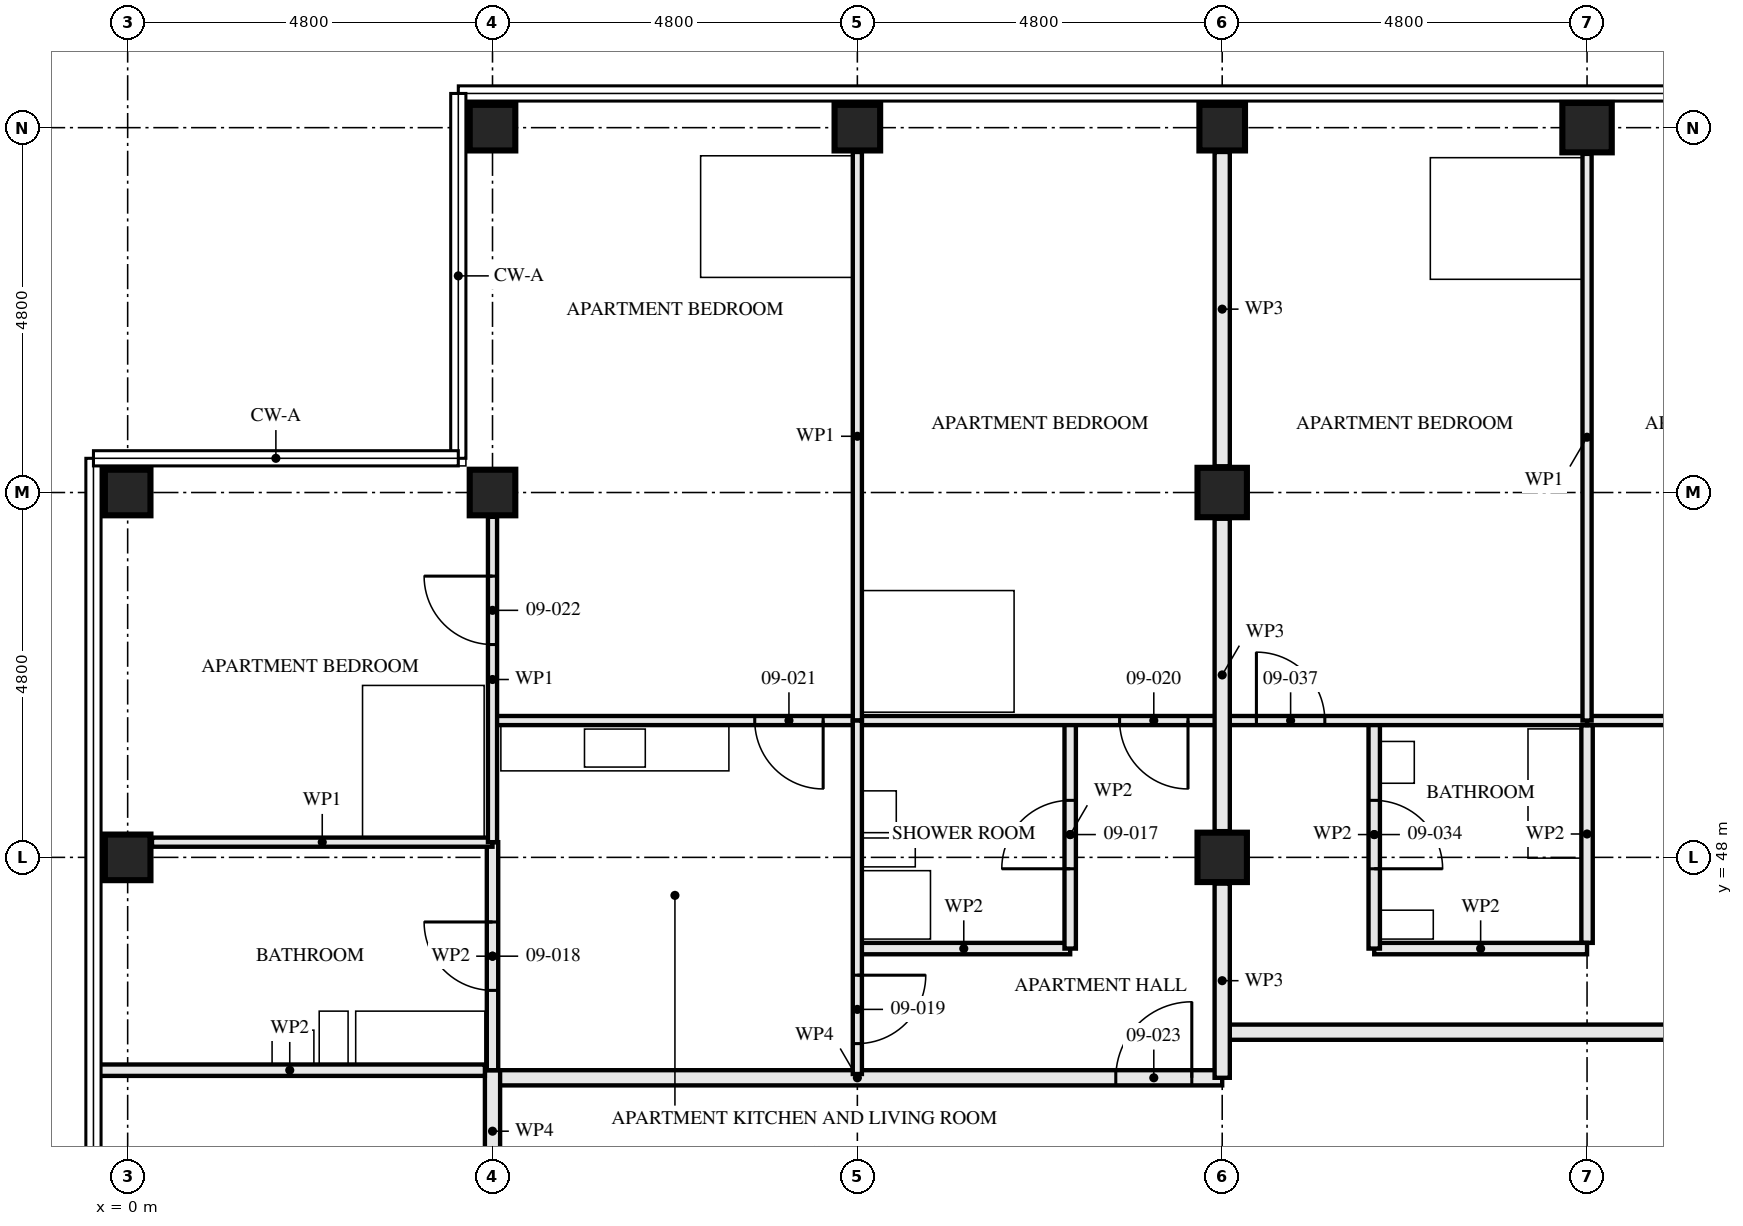
"""IFC4 building model, lengths in metres.
Left out: names, types, materials, properties, quantities, classifications, styles, units other than length and angle.
Written with IfcOpenShell. Run it as: python <this file> out.ifc"""

import sys

from ifc_helpers import new_model, si_unit, direction, frame, frame_2d, origin, origin_2d, place, context, subcontext, project, spatial, rectangle, hollow_rectangle, extrude, element, fill, save


model = new_model("IFC4")
c1 = context("Model", 3, precision=1e-05, world=origin(), true_north=direction((0.0, 1.0)))
c2 = subcontext(c1, "Body", "Model", "MODEL_VIEW")
j1 = project(units=[si_unit("LENGTHUNIT", "METRE"), si_unit("PLANEANGLEUNIT", "RADIAN")], contexts=[c1])
p1 = place(None, origin())
s1 = spatial("IfcSite", under=j1, at=p1, CompositionType="ELEMENT")
p2 = place(p1, origin())
s2 = spatial("IfcBuilding", under=s1, at=p2, CompositionType="ELEMENT")
p3 = place(p2, frame((0.0, 0.0, 37.5)))
s3 = spatial("IfcBuildingStorey", under=s2, at=p3, CompositionType="ELEMENT", Elevation=37.5)
for number, where, z_axis, x_axis in (
    (1, (0.0, 48.0, 0.0), (0.0, 0.0, 1.0), (1.0, 0.0, 0.0)),
    (2, (0.0, 52.8, 0.0), (0.0, 0.0, 1.0), (0.0, 1.0, 0.0)),
    (3, (4.8, 52.8, 0.0), (0.0, 0.0, 1.0), (0.0, 1.0, 0.0)),
    (4, (4.8, 57.6, 0.0), (0.0, 0.0, 1.0), (0.0, 1.0, 0.0)),
    (5, (9.6, 57.6, 0.0), (0.0, 0.0, 1.0), (0.0, 1.0, 0.0)),
):
    element("IfcColumn", number, at=place(p3, frame(where, z_axis=z_axis, x_axis=x_axis)), inside=s3, PredefinedType="COLUMN", context=c2, shape_type="SweptSolid", body=[
        extrude(hollow_rectangle(XDim=0.6, YDim=0.6, WallThickness=0.08, at=origin_2d()), origin(), (0.0, 0.0, 1.0), 3.5),
    ])
for number, where, z_axis, x_axis in (
    (6, (14.4, 48.0, 0.0), (0.0, 0.0, 1.0), (1.0, 0.0, 0.0)),
    (7, (14.4, 52.8, 0.0), (0.0, 0.0, 1.0), (1.0, 0.0, 0.0)),
):
    element("IfcColumn", number, at=place(p3, frame(where, z_axis=z_axis, x_axis=x_axis)), inside=s3, PredefinedType="COLUMN", context=c2, shape_type="SweptSolid", body=[
        extrude(hollow_rectangle(XDim=0.65, YDim=0.65, WallThickness=0.05, at=origin_2d()), origin(), (0.0, 0.0, 1.0), 3.5),
    ])
p4 = place(p3, frame((14.4, 57.6, 0.0), z_axis=(0.0, 0.0, 1.0), x_axis=(0.0, 1.0, 0.0)))
e8 = element("IfcColumn", 8, at=p4, inside=s3, PredefinedType="COLUMN", context=c2, shape_type="SweptSolid", body=[
    extrude(hollow_rectangle(XDim=0.6, YDim=0.6, WallThickness=0.08, at=origin_2d()), origin(), (0.0, 0.0, 1.0), 3.5),
])
p5 = place(p3, frame((19.2, 57.6, 0.0), z_axis=(0.0, 0.0, 1.0), x_axis=(0.0, 1.0, 0.0)))
e9 = element("IfcColumn", 9, at=p5, inside=s3, PredefinedType="COLUMN", context=c2, shape_type="SweptSolid", body=[
    extrude(hollow_rectangle(XDim=0.65, YDim=0.65, WallThickness=0.08, at=origin_2d()), origin(), (0.0, 0.0, 1.0), 3.5),
])
p6 = place(p3, frame((12.4, 49.8, 0.0), z_axis=(0.0, 0.0, 1.0), x_axis=(0.0, -1.0, 0.0)))
e10 = element("IfcWall", 10, at=p6, inside=s3, PredefinedType="PARTITIONING", context=c2, shape_type="SweptSolid", body=[
    extrude(rectangle(XDim=3.0, YDim=0.15, at=frame_2d((1.5, 0.0))), origin(), (0.0, 0.0, 1.0), 2.55),
])
p7 = place(p6, frame((1.05, 0.0, 0.0)))
e11 = element("IfcOpeningElement", 11, at=p7, cuts=e10, PredefinedType="OPENING", context=c2, shape_type="SweptSolid", body=[
    extrude(rectangle(XDim=0.9, YDim=2.1, at=frame_2d((0.45, 1.05))), frame((0.0, 0.085, 0.0), z_axis=(0.0, -1.0, 0.0), x_axis=(1.0, 0.0, 0.0)), (0.0, 0.0, 1.0), 0.171),
])
p8 = place(p3, frame((12.4, 46.8, 0.0), z_axis=(0.0, 0.0, 1.0), x_axis=(-1.0, 0.0, 0.0)))
e12 = element("IfcWall", 12, at=p8, inside=s3, PredefinedType="PARTITIONING", context=c2, shape_type="SweptSolid", body=[
    extrude(rectangle(XDim=2.8, YDim=0.15, at=frame_2d((1.4, 0.0))), origin(), (0.0, 0.0, 1.0), 3.33),
])
p9 = place(p3, frame((4.8, 48.2, 0.0), z_axis=(0.0, 0.0, 1.0), x_axis=(0.0, -1.0, 0.0)))
e13 = element("IfcWall", 13, at=p9, inside=s3, PredefinedType="PARTITIONING", context=c2, shape_type="SweptSolid", body=[
    extrude(rectangle(XDim=3.0, YDim=0.15, at=frame_2d((1.5, 0.0))), origin(), (0.0, 0.0, 1.0), 2.55),
])
p10 = place(p9, frame((1.05, 0.0, 0.0)))
e14 = element("IfcOpeningElement", 14, at=p10, cuts=e13, PredefinedType="OPENING", context=c2, shape_type="SweptSolid", body=[
    extrude(rectangle(XDim=0.9, YDim=2.1, at=frame_2d((0.45, 1.05))), frame((0.0, 0.085, 0.0), z_axis=(0.0, -1.0, 0.0), x_axis=(1.0, 0.0, 0.0)), (0.0, 0.0, 1.0), 0.171),
])
p11 = place(p3, frame((9.6, 49.8, 0.0), z_axis=(0.0, 0.0, 1.0), x_axis=(0.0, -1.0, 0.0)))
e15 = element("IfcWall", 15, at=p11, inside=s3, PredefinedType="PARTITIONING", context=c2, shape_type="SweptSolid", body=[
    extrude(rectangle(XDim=4.65, YDim=0.12, at=frame_2d((2.325, 0.0))), origin(), (0.0, 0.0, 1.0), 2.55),
])
p12 = place(p11, frame((3.35, 0.0, 0.0)))
e16 = element("IfcOpeningElement", 16, at=p12, cuts=e15, PredefinedType="OPENING", context=c2, shape_type="SweptSolid", body=[
    extrude(rectangle(XDim=0.9, YDim=2.1, at=frame_2d((0.45, 1.05))), frame((0.0, 0.071, 0.0), z_axis=(0.0, -1.0, 0.0), x_axis=(1.0, 0.0, 0.0)), (0.0, 0.0, 1.0), 0.141),
])
p13 = place(p3, frame((14.4, 49.8, 0.0), z_axis=(0.0, 0.0, 1.0), x_axis=(-1.0, 0.0, 0.0)))
e17 = element("IfcWall", 17, at=p13, inside=s3, PredefinedType="PARTITIONING", context=c2, shape_type="SweptSolid", body=[
    extrude(rectangle(XDim=4.8, YDim=0.12, at=frame_2d((2.4, 0.0))), origin(), (0.0, 0.0, 1.0), 3.33),
])
p14 = place(p13, frame((0.45, 0.0, 0.0)))
e18 = element("IfcOpeningElement", 18, at=p14, cuts=e17, PredefinedType="OPENING", context=c2, shape_type="SweptSolid", body=[
    extrude(rectangle(XDim=0.9, YDim=2.1, at=frame_2d((0.45, 1.05))), frame((0.0, 0.071, 0.0), z_axis=(0.0, -1.0, 0.0), x_axis=(1.0, 0.0, 0.0)), (0.0, 0.0, 1.0), 0.141),
])
p15 = place(p3, frame((9.6, 49.8, 0.0), z_axis=(0.0, 0.0, 1.0), x_axis=(-1.0, 0.0, 0.0)))
e19 = element("IfcWall", 19, at=p15, inside=s3, PredefinedType="PARTITIONING", context=c2, shape_type="SweptSolid", body=[
    extrude(rectangle(XDim=4.8, YDim=0.12, at=frame_2d((2.4, 0.0))), origin(), (0.0, 0.0, 1.0), 3.33),
])
p16 = place(p15, frame((0.45, 0.0, 0.0)))
e20 = element("IfcOpeningElement", 20, at=p16, cuts=e19, PredefinedType="OPENING", context=c2, shape_type="SweptSolid", body=[
    extrude(rectangle(XDim=0.9, YDim=2.1, at=frame_2d((0.45, 1.05))), frame((0.0, 0.071, 0.0), z_axis=(0.0, -1.0, 0.0), x_axis=(1.0, 0.0, 0.0)), (0.0, 0.0, 1.0), 0.141),
])
p17 = place(p3, frame((4.8, 48.2, 0.0), z_axis=(0.0, 0.0, 1.0), x_axis=(-1.0, 0.0, 0.0)))
e21 = element("IfcWall", 21, at=p17, inside=s3, PredefinedType="PARTITIONING", context=c2, shape_type="SweptSolid", body=[
    extrude(rectangle(XDim=4.48, YDim=0.12, at=frame_2d((2.24, 0.0))), origin(), (0.0, 0.0, 1.0), 3.33),
])
p18 = place(p3, frame((9.6, 57.28, 0.0), z_axis=(0.0, 0.0, 1.0), x_axis=(0.0, -1.0, 0.0)))
e22 = element("IfcWall", 22, at=p18, inside=s3, PredefinedType="PARTITIONING", context=c2, shape_type="SweptSolid", body=[
    extrude(rectangle(XDim=7.48, YDim=0.12, at=frame_2d((3.74, 0.0))), origin(), (0.0, 0.0, 1.0), 2.55),
])
p19 = place(p3, frame((4.8, 52.48, 0.0), z_axis=(0.0, 0.0, 1.0), x_axis=(0.0, -1.0, 0.0)))
e23 = element("IfcWall", 23, at=p19, inside=s3, PredefinedType="PARTITIONING", context=c2, shape_type="SweptSolid", body=[
    extrude(rectangle(XDim=4.28, YDim=0.12, at=frame_2d((2.14, 0.0))), origin(), (0.0, 0.0, 1.0), 3.33),
])
p20 = place(p19, frame((0.78, 0.0, 0.0)))
e24 = element("IfcOpeningElement", 24, at=p20, cuts=e23, PredefinedType="OPENING", context=c2, shape_type="SweptSolid", body=[
    extrude(rectangle(XDim=0.9, YDim=2.1, at=frame_2d((0.45, 1.05))), frame((0.0, 0.071, 0.0), z_axis=(0.0, -1.0, 0.0), x_axis=(1.0, 0.0, 0.0)), (0.0, 0.0, 1.0), 0.141),
])
p21 = place(p3, frame((14.4, 45.1, 0.0), z_axis=(0.0, 0.0, 1.0), x_axis=(-1.0, 0.0, 0.0)))
e25 = element("IfcWall", 25, at=p21, inside=s3, PredefinedType="PARTITIONING", context=c2, shape_type="SweptSolid", body=[
    extrude(rectangle(XDim=9.6, YDim=0.2, at=frame_2d((4.8, 0.0))), origin(), (0.0, 0.0, 1.0), 3.33),
])
p22 = place(p21, frame((0.4, 0.0, 0.0)))
e26 = element("IfcOpeningElement", 26, at=p22, cuts=e25, PredefinedType="OPENING", context=c2, shape_type="SweptSolid", body=[
    extrude(rectangle(XDim=1.0, YDim=2.1, at=frame_2d((0.5, 1.05))), frame((0.0, 0.111, 0.0), z_axis=(0.0, -1.0, 0.0), x_axis=(1.0, 0.0, 0.0)), (0.0, 0.0, 1.0), 0.221),
])
p23 = place(p3, frame((4.8, 45.2, 0.0), z_axis=(0.0, 0.0, 1.0), x_axis=(0.0, -1.0, 0.0)))
e27 = element("IfcWall", 27, at=p23, inside=s3, PredefinedType="PARTITIONING", context=c2, shape_type="SweptSolid", body=[
    extrude(rectangle(XDim=1.605, YDim=0.2, at=frame_2d((0.802, 0.0))), origin(), (0.0, 0.0, 1.0), 3.33),
])
p24 = place(p3, frame((16.4, 49.8, 0.0), z_axis=(0.0, 0.0, 1.0), x_axis=(0.0, -1.0, 0.0)))
e28 = element("IfcWall", 28, at=p24, inside=s3, PredefinedType="PARTITIONING", context=c2, shape_type="SweptSolid", body=[
    extrude(rectangle(XDim=3.0, YDim=0.15, at=frame_2d((1.5, 0.0))), origin(), (0.0, 0.0, 1.0), 2.55),
])
p25 = place(p24, frame((1.05, 0.0, 0.0)))
e29 = element("IfcOpeningElement", 29, at=p25, cuts=e28, PredefinedType="OPENING", context=c2, shape_type="SweptSolid", body=[
    extrude(rectangle(XDim=0.9, YDim=2.1, at=frame_2d((0.45, 1.05))), frame((0.0, 0.085, 0.0), z_axis=(0.0, -1.0, 0.0), x_axis=(1.0, 0.0, 0.0)), (0.0, 0.0, 1.0), 0.171),
])
p26 = place(p3, frame((19.2, 46.8, 0.0), z_axis=(0.0, 0.0, 1.0), x_axis=(-1.0, 0.0, 0.0)))
e30 = element("IfcWall", 30, at=p26, inside=s3, PredefinedType="PARTITIONING", context=c2, shape_type="SweptSolid", body=[
    extrude(rectangle(XDim=2.8, YDim=0.15, at=frame_2d((1.4, 0.0))), origin(), (0.0, 0.0, 1.0), 3.33),
])
p27 = place(p3, frame((24.0, 49.8, 0.0), z_axis=(0.0, 0.0, 1.0), x_axis=(-1.0, 0.0, 0.0)))
e31 = element("IfcWall", 31, at=p27, inside=s3, PredefinedType="PARTITIONING", context=c2, shape_type="SweptSolid", body=[
    extrude(rectangle(XDim=4.8, YDim=0.12, at=frame_2d((2.4, 0.0))), origin(), (0.0, 0.0, 1.0), 3.33),
])
p28 = place(p27, frame((0.45, 0.0, 0.0)))
e32 = element("IfcOpeningElement", 32, at=p28, cuts=e31, PredefinedType="OPENING", context=c2, shape_type="SweptSolid", body=[
    extrude(rectangle(XDim=0.9, YDim=2.1, at=frame_2d((0.45, 1.05))), frame((0.0, 0.071, 0.0), z_axis=(0.0, -1.0, 0.0), x_axis=(1.0, 0.0, 0.0)), (0.0, 0.0, 1.0), 0.141),
])
p29 = place(p3, frame((19.2, 49.8, 0.0), z_axis=(0.0, 0.0, 1.0), x_axis=(-1.0, 0.0, 0.0)))
e33 = element("IfcWall", 33, at=p29, inside=s3, PredefinedType="PARTITIONING", context=c2, shape_type="SweptSolid", body=[
    extrude(rectangle(XDim=4.8, YDim=0.12, at=frame_2d((2.4, 0.0))), origin(), (0.0, 0.0, 1.0), 3.33),
])
p30 = place(p29, frame((3.45, 0.0, 0.0)))
e34 = element("IfcOpeningElement", 34, at=p30, cuts=e33, PredefinedType="OPENING", context=c2, shape_type="SweptSolid", body=[
    extrude(rectangle(XDim=0.9, YDim=2.1, at=frame_2d((0.45, 1.05))), frame((0.0, 0.071, 0.0), z_axis=(0.0, -1.0, 0.0), x_axis=(1.0, 0.0, 0.0)), (0.0, 0.0, 1.0), 0.141),
])
p31 = place(p3, frame((19.2, 57.255, 0.0), z_axis=(0.0, 0.0, 1.0), x_axis=(0.0, -1.0, 0.0)))
e35 = element("IfcWall", 35, at=p31, inside=s3, PredefinedType="PARTITIONING", context=c2, shape_type="SweptSolid", body=[
    extrude(rectangle(XDim=7.455, YDim=0.12, at=frame_2d((3.728, 0.0))), origin(), (0.0, 0.0, 1.0), 2.55),
])
p32 = place(p3, frame((28.8, 45.7, 0.0), z_axis=(0.0, 0.0, 1.0), x_axis=(-1.0, 0.0, 0.0)))
e36 = element("IfcWall", 36, at=p32, inside=s3, PredefinedType="PARTITIONING", context=c2, shape_type="SweptSolid", body=[
    extrude(rectangle(XDim=14.4, YDim=0.2, at=frame_2d((7.2, 0.0))), origin(), (0.0, 0.0, 1.0), 3.33),
])
p33 = place(p32, frame((0.4, 0.0, 0.0)))
e37 = element("IfcOpeningElement", 37, at=p33, cuts=e36, PredefinedType="OPENING", context=c2, shape_type="SweptSolid", body=[
    extrude(rectangle(XDim=1.0, YDim=2.1, at=frame_2d((0.5, 1.05))), frame((0.0, 0.111, 0.0), z_axis=(0.0, -1.0, 0.0), x_axis=(1.0, 0.0, 0.0)), (0.0, 0.0, 1.0), 0.221),
])
p34 = place(p3, frame((14.4, 45.1, 0.0), z_axis=(0.0, 0.0, 1.0), x_axis=(0.0, 1.0, 0.0)))
e38 = element("IfcWall", 38, at=p34, inside=s3, PredefinedType="PARTITIONING", context=c2, shape_type="SweptSolid", body=[
    extrude(rectangle(XDim=2.555, YDim=0.2, at=frame_2d((1.277, 0.0))), origin(), (0.0, 0.0, 1.0), 2.32),
])
p35 = place(p3, frame((14.4, 48.345, 0.0), z_axis=(0.0, 0.0, 1.0), x_axis=(0.0, 1.0, 0.0)))
e39 = element("IfcWall", 39, at=p35, inside=s3, PredefinedType="PARTITIONING", context=c2, shape_type="SweptSolid", body=[
    extrude(rectangle(XDim=4.11, YDim=0.2, at=frame_2d((2.055, 0.0))), origin(), (0.0, 0.0, 1.0), 2.32),
])
p36 = place(p3, frame((14.4, 53.145, 0.0), z_axis=(0.0, 0.0, 1.0), x_axis=(0.0, 1.0, 0.0)))
e40 = element("IfcWall", 40, at=p36, inside=s3, PredefinedType="PARTITIONING", context=c2, shape_type="SweptSolid", body=[
    extrude(rectangle(XDim=4.135, YDim=0.2, at=frame_2d((2.067, 0.0))), origin(), (0.0, 0.0, 1.0), 2.32),
])
p37 = place(p3, frame((4.7, 45.2, 0.0), z_axis=(0.0, 0.0, 1.0), x_axis=(-1.0, 0.0, 0.0)))
e41 = element("IfcWall", 41, at=p37, inside=s3, PredefinedType="PARTITIONING", context=c2, shape_type="SweptSolid", body=[
    extrude(rectangle(XDim=5.135, YDim=0.15, at=frame_2d((2.567, 0.0))), origin(), (0.0, 0.0, 1.0), 2.32),
])
p38 = place(p3, frame((19.2, 49.74, 0.0), z_axis=(0.0, 0.0, 1.0), x_axis=(0.0, -1.0, 0.0)))
e42 = element("IfcWall", 42, at=p38, inside=s3, PredefinedType="PARTITIONING", context=c2, shape_type="SweptSolid", body=[
    extrude(rectangle(XDim=2.865, YDim=0.15, at=frame_2d((1.433, 0.0))), origin(), (0.0, 0.0, 1.0), 2.55),
])
p39 = place(p7, frame((0.9, 0.0, 0.0), z_axis=(0.0, 0.0, 1.0), x_axis=(-1.0, 0.0, 0.0)))
e43 = element("IfcDoor", 43, at=p39, inside=s3, OperationType="SINGLE_SWING_RIGHT", PredefinedType="DOOR", context=c2, shape_type="SweptSolid", body=[
    extrude(rectangle(XDim=0.9, YDim=2.1, at=frame_2d((0.45, 1.05))), frame((0.0, 0.022, 0.0), z_axis=(0.0, -1.0, 0.0), x_axis=(1.0, 0.0, 0.0)), (0.0, 0.0, 1.0), 0.044),
])
fill(e11, e43)
p40 = place(p10, frame((0.9, 0.0, 0.0), z_axis=(0.0, 0.0, 1.0), x_axis=(-1.0, 0.0, 0.0)))
e44 = element("IfcDoor", 44, at=p40, inside=s3, OperationType="SINGLE_SWING_LEFT", PredefinedType="DOOR", context=c2, shape_type="SweptSolid", body=[
    extrude(rectangle(XDim=0.9, YDim=2.1, at=frame_2d((0.45, 1.05))), frame((0.0, 0.022, 0.0), z_axis=(0.0, -1.0, 0.0), x_axis=(1.0, 0.0, 0.0)), (0.0, 0.0, 1.0), 0.044),
])
fill(e14, e44)
p41 = place(p12, origin())
e45 = element("IfcDoor", 45, at=p41, inside=s3, OperationType="SINGLE_SWING_RIGHT", PredefinedType="DOOR", context=c2, shape_type="SweptSolid", body=[
    extrude(rectangle(XDim=0.9, YDim=2.1, at=frame_2d((0.45, 1.05))), frame((0.0, 0.022, 0.0), z_axis=(0.0, -1.0, 0.0), x_axis=(1.0, 0.0, 0.0)), (0.0, 0.0, 1.0), 0.044),
])
fill(e16, e45)
p42 = place(p14, origin())
e46 = element("IfcDoor", 46, at=p42, inside=s3, OperationType="SINGLE_SWING_RIGHT", PredefinedType="DOOR", context=c2, shape_type="SweptSolid", body=[
    extrude(rectangle(XDim=0.9, YDim=2.1, at=frame_2d((0.45, 1.05))), frame((0.0, 0.022, 0.0), z_axis=(0.0, -1.0, 0.0), x_axis=(1.0, 0.0, 0.0)), (0.0, 0.0, 1.0), 0.044),
])
fill(e18, e46)
p43 = place(p16, origin())
e47 = element("IfcDoor", 47, at=p43, inside=s3, OperationType="SINGLE_SWING_RIGHT", PredefinedType="DOOR", context=c2, shape_type="SweptSolid", body=[
    extrude(rectangle(XDim=0.9, YDim=2.1, at=frame_2d((0.45, 1.05))), frame((0.0, 0.022, 0.0), z_axis=(0.0, -1.0, 0.0), x_axis=(1.0, 0.0, 0.0)), (0.0, 0.0, 1.0), 0.044),
])
fill(e20, e47)
p44 = place(p20, frame((0.9, 0.0, 0.0), z_axis=(0.0, 0.0, 1.0), x_axis=(-1.0, 0.0, 0.0)))
e48 = element("IfcDoor", 48, at=p44, inside=s3, OperationType="SINGLE_SWING_LEFT", PredefinedType="DOOR", context=c2, shape_type="SweptSolid", body=[
    extrude(rectangle(XDim=0.9, YDim=2.1, at=frame_2d((0.45, 1.05))), frame((0.0, 0.022, 0.0), z_axis=(0.0, -1.0, 0.0), x_axis=(1.0, 0.0, 0.0)), (0.0, 0.0, 1.0), 0.044),
])
fill(e24, e48)
p45 = place(p22, frame((1.0, 0.0, 0.0), z_axis=(0.0, 0.0, 1.0), x_axis=(-1.0, 0.0, 0.0)))
e49 = element("IfcDoor", 49, at=p45, inside=s3, OperationType="SINGLE_SWING_LEFT", PredefinedType="DOOR", context=c2, shape_type="SweptSolid", body=[
    extrude(rectangle(XDim=1.0, YDim=2.1, at=frame_2d((0.5, 1.05))), frame((0.0, 0.027, 0.0), z_axis=(0.0, -1.0, 0.0), x_axis=(1.0, 0.0, 0.0)), (0.0, 0.0, 1.0), 0.054),
])
fill(e26, e49)
p46 = place(p25, origin())
e50 = element("IfcDoor", 50, at=p46, inside=s3, OperationType="SINGLE_SWING_LEFT", PredefinedType="DOOR", context=c2, shape_type="SweptSolid", body=[
    extrude(rectangle(XDim=0.9, YDim=2.1, at=frame_2d((0.45, 1.05))), frame((0.0, 0.022, 0.0), z_axis=(0.0, -1.0, 0.0), x_axis=(1.0, 0.0, 0.0)), (0.0, 0.0, 1.0), 0.044),
])
fill(e29, e50)
p47 = place(p30, frame((0.9, 0.0, 0.0), z_axis=(0.0, 0.0, 1.0), x_axis=(-1.0, 0.0, 0.0)))
e51 = element("IfcDoor", 51, at=p47, inside=s3, OperationType="SINGLE_SWING_RIGHT", PredefinedType="DOOR", context=c2, shape_type="SweptSolid", body=[
    extrude(rectangle(XDim=0.9, YDim=2.1, at=frame_2d((0.45, 1.05))), frame((0.0, 0.022, 0.0), z_axis=(0.0, -1.0, 0.0), x_axis=(1.0, 0.0, 0.0)), (0.0, 0.0, 1.0), 0.044),
])
fill(e34, e51)
save(model, sys.argv[1])
